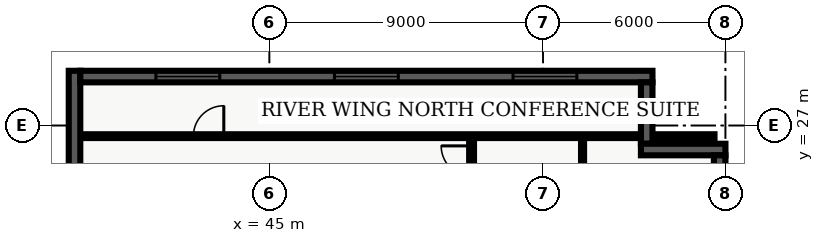
"""IFC4 building model, lengths in metres.
Left out: names, types, materials, properties, quantities, classifications, styles, units other than length and angle.
Written with IfcOpenShell. Run it as: python <this file> out.ifc"""

import sys

from ifc_helpers import new_model, entity, si_unit, converted_unit, direction, frame, origin_with_axes, origin_2d_with_axis, place, context, subcontext, project, spatial, polyline, rectangle, outline, extrude, element, fill, save


model = new_model("IFC4")
c1 = context("Model", 3, precision=1e-05, world=origin_with_axes(), true_north=direction((0.0, 1.0)))
c2 = subcontext(c1, "Body", "Model", "MODEL_VIEW")
j1 = project(units=[si_unit("LENGTHUNIT", "METRE"), converted_unit("PLANEANGLEUNIT", "DEGREE", entity("IfcPlaneAngleMeasure", 0.017), si_unit("PLANEANGLEUNIT", "RADIAN"), dimensions=[0, 0, 0, 0, 0, 0, 0])], contexts=[c1])
p1 = place(None, origin_with_axes())
s1 = spatial("IfcSite", under=j1, at=p1, CompositionType="ELEMENT")
p2 = place(p1, origin_with_axes())
s2 = spatial("IfcBuilding", under=s1, at=p2, CompositionType="ELEMENT")
p3 = place(p2, frame((0.0, 0.0, 40.5), z_axis=(0.0, 0.0, 1.0), x_axis=(1.0, 0.0, 0.0)))
s3 = spatial("IfcBuildingStorey", under=s2, at=p3, CompositionType="ELEMENT", Elevation=40.5)
p4 = place(p3, frame((51.65, 7.85, 0.0), z_axis=(0.0, 0.0, 1.0), x_axis=(0.0, 1.0, 0.0)))
e1 = element("IfcWall", 1, at=p4, inside=s3, PredefinedType="PARTITIONING", context=c2, shape_type="SweptSolid", body=[
    extrude(outline(polyline([(0.0, -0.08), (18.8, -0.08), (18.8, 0.08), (0.0, 0.08), (0.0, -0.08)])), origin_with_axes(), (0.0, 0.0, 1.0), 2.7),
])
p5 = place(p4, frame((4.453, 0.0, 0.0), z_axis=(0.0, 0.0, 1.0), x_axis=(1.0, 0.0, 0.0)))
e2 = element("IfcOpeningElement", 2, at=p5, cuts=e1, PredefinedType="OPENING", context=c2, shape_type="SweptSolid", body=[
    extrude(rectangle(XDim=1.0, YDim=0.18, at=origin_2d_with_axis()), origin_with_axes(), (0.0, 0.0, 1.0), 2.15),
])
p6 = place(p4, frame((7.831, 0.0, 0.0), z_axis=(0.0, 0.0, 1.0), x_axis=(1.0, 0.0, 0.0)))
e3 = element("IfcOpeningElement", 3, at=p6, cuts=e1, PredefinedType="OPENING", context=c2, shape_type="SweptSolid", body=[
    extrude(rectangle(XDim=1.0, YDim=0.18, at=origin_2d_with_axis()), origin_with_axes(), (0.0, 0.0, 1.0), 2.15),
])
p7 = place(p4, frame((11.898, 0.0, 0.0), z_axis=(0.0, 0.0, 1.0), x_axis=(1.0, 0.0, 0.0)))
e4 = element("IfcOpeningElement", 4, at=p7, cuts=e1, PredefinedType="OPENING", context=c2, shape_type="SweptSolid", body=[
    extrude(rectangle(XDim=1.0, YDim=0.18, at=origin_2d_with_axis()), origin_with_axes(), (0.0, 0.0, 1.0), 2.15),
])
p8 = place(p4, frame((17.98, 0.0, 0.0), z_axis=(0.0, 0.0, 1.0), x_axis=(1.0, 0.0, 0.0)))
e5 = element("IfcOpeningElement", 5, at=p8, cuts=e1, PredefinedType="OPENING", context=c2, shape_type="SweptSolid", body=[
    extrude(rectangle(XDim=1.0, YDim=0.18, at=origin_2d_with_axis()), origin_with_axes(), (0.0, 0.0, 1.0), 2.15),
])
p9 = place(p3, frame((38.76, 26.65, 0.0), z_axis=(0.0, 0.0, 1.0), x_axis=(1.0, 0.0, 0.0)))
e6 = element("IfcWall", 6, at=p9, inside=s3, PredefinedType="PARTITIONING", context=c2, shape_type="SweptSolid", body=[
    extrude(outline(polyline([(0.0, -0.062), (20.88, -0.062), (20.88, 0.062), (0.0, 0.062), (0.0, -0.062)])), origin_with_axes(), (0.0, 0.0, 1.0), 2.7),
])
p10 = place(p9, frame((4.24, 0.0, 0.0), z_axis=(0.0, 0.0, 1.0), x_axis=(1.0, 0.0, 0.0)))
e7 = element("IfcOpeningElement", 7, at=p10, cuts=e6, PredefinedType="OPENING", context=c2, shape_type="SweptSolid", body=[
    extrude(rectangle(XDim=1.0, YDim=0.145, at=origin_2d_with_axis()), origin_with_axes(), (0.0, 0.0, 1.0), 2.15),
])
p11 = place(p3, frame((55.3, 7.98, 0.0), z_axis=(0.0, 0.0, 1.0), x_axis=(0.0, 1.0, 0.0)))
e8 = element("IfcWall", 8, at=p11, inside=s3, PredefinedType="PARTITIONING", context=c2, shape_type="SweptSolid", body=[
    extrude(outline(polyline([(0.0, -0.05), (18.54, -0.05), (18.54, 0.05), (0.0, 0.05), (0.0, -0.05)])), origin_with_axes(), (0.0, 0.0, 1.0), 2.7),
])
p12 = place(p11, frame((3.073, 0.0, 0.0), z_axis=(0.0, 0.0, 1.0), x_axis=(1.0, 0.0, 0.0)))
e9 = element("IfcOpeningElement", 9, at=p12, cuts=e8, PredefinedType="OPENING", context=c2, shape_type="SweptSolid", body=[
    extrude(rectangle(XDim=0.95, YDim=0.12, at=origin_2d_with_axis()), origin_with_axes(), (0.0, 0.0, 1.0), 2.15),
])
p13 = place(p11, frame((7.981, 0.0, 0.0), z_axis=(0.0, 0.0, 1.0), x_axis=(1.0, 0.0, 0.0)))
e10 = element("IfcOpeningElement", 10, at=p13, cuts=e8, PredefinedType="OPENING", context=c2, shape_type="SweptSolid", body=[
    extrude(rectangle(XDim=0.95, YDim=0.12, at=origin_2d_with_axis()), origin_with_axes(), (0.0, 0.0, 1.0), 2.15),
])
p14 = place(p11, frame((11.768, 0.0, 0.0), z_axis=(0.0, 0.0, 1.0), x_axis=(1.0, 0.0, 0.0)))
e11 = element("IfcOpeningElement", 11, at=p14, cuts=e8, PredefinedType="OPENING", context=c2, shape_type="SweptSolid", body=[
    extrude(rectangle(XDim=0.95, YDim=0.12, at=origin_2d_with_axis()), origin_with_axes(), (0.0, 0.0, 1.0), 2.15),
])
p15 = place(p11, frame((16.201, 0.0, 0.0), z_axis=(0.0, 0.0, 1.0), x_axis=(1.0, 0.0, 0.0)))
e12 = element("IfcOpeningElement", 12, at=p15, cuts=e8, PredefinedType="OPENING", context=c2, shape_type="SweptSolid", body=[
    extrude(rectangle(XDim=0.95, YDim=0.12, at=origin_2d_with_axis()), origin_with_axes(), (0.0, 0.0, 1.0), 2.15),
])
p16 = place(p3, frame((38.59, 21.22, 0.0), z_axis=(0.0, 0.0, 1.0), x_axis=(0.0, 1.0, 0.0)))
e13 = element("IfcWall", 13, at=p16, inside=s3, PredefinedType="SOLIDWALL", context=c2, shape_type="SweptSolid", body=[
    extrude(outline(polyline([(0.0, -0.19), (7.58, -0.19), (7.58, 0.19), (0.0, 0.19), (0.0, -0.19)])), origin_with_axes(), (0.0, 0.0, 1.0), 3.66),
])
p17 = place(p3, frame((38.78, 28.61, 0.0), z_axis=(0.0, 0.0, 1.0), x_axis=(1.0, 0.0, 0.0)))
e14 = element("IfcWall", 14, at=p17, inside=s3, PredefinedType="SOLIDWALL", context=c2, shape_type="SweptSolid", body=[
    extrude(outline(polyline([(0.0, -0.19), (18.82, -0.19), (18.82, 0.19), (0.0, 0.19), (0.0, -0.19)])), origin_with_axes(), (0.0, 0.0, 1.0), 3.66),
])
p18 = place(p17, frame((3.537, 0.0, 0.45), z_axis=(0.0, 0.0, 1.0), x_axis=(1.0, 0.0, 0.0)))
e15 = element("IfcOpeningElement", 15, at=p18, cuts=e14, PredefinedType="OPENING", context=c2, shape_type="SweptSolid", body=[
    extrude(rectangle(XDim=2.1, YDim=0.4, at=origin_2d_with_axis()), origin_with_axes(), (0.0, 0.0, 1.0), 2.2),
])
p19 = place(p17, frame((9.41, 0.0, 0.45), z_axis=(0.0, 0.0, 1.0), x_axis=(1.0, 0.0, 0.0)))
e16 = element("IfcOpeningElement", 16, at=p19, cuts=e14, PredefinedType="OPENING", context=c2, shape_type="SweptSolid", body=[
    extrude(rectangle(XDim=2.1, YDim=0.4, at=origin_2d_with_axis()), origin_with_axes(), (0.0, 0.0, 1.0), 2.2),
])
p20 = place(p17, frame((15.283, 0.0, 0.45), z_axis=(0.0, 0.0, 1.0), x_axis=(1.0, 0.0, 0.0)))
e17 = element("IfcOpeningElement", 17, at=p20, cuts=e14, PredefinedType="OPENING", context=c2, shape_type="SweptSolid", body=[
    extrude(rectangle(XDim=2.1, YDim=0.4, at=origin_2d_with_axis()), origin_with_axes(), (0.0, 0.0, 1.0), 2.2),
])
p21 = place(p3, frame((57.41, 28.42, 0.0), z_axis=(0.0, 0.0, 1.0), x_axis=(0.0, -1.0, 0.0)))
e18 = element("IfcWall", 18, at=p21, inside=s3, PredefinedType="SOLIDWALL", context=c2, shape_type="SweptSolid", body=[
    extrude(outline(polyline([(0.0, -0.19), (2.02, -0.19), (2.02, 0.19), (0.0, 0.19), (0.0, -0.19)])), origin_with_axes(), (0.0, 0.0, 1.0), 3.66),
])
p22 = place(p3, frame((57.22, 26.21, 0.0), z_axis=(0.0, 0.0, 1.0), x_axis=(1.0, 0.0, 0.0)))
e19 = element("IfcWall", 19, at=p22, inside=s3, PredefinedType="SOLIDWALL", context=c2, shape_type="SweptSolid", body=[
    extrude(outline(polyline([(0.0, -0.19), (2.78, -0.19), (2.78, 0.19), (0.0, 0.19), (0.0, -0.19)])), origin_with_axes(), (0.0, 0.0, 1.0), 3.66),
])
p23 = place(p3, frame((59.81, 26.02, 0.0), z_axis=(0.0, 0.0, 1.0), x_axis=(0.0, -1.0, 0.0)))
e20 = element("IfcWall", 20, at=p23, inside=s3, PredefinedType="SOLIDWALL", context=c2, shape_type="SweptSolid", body=[
    extrude(outline(polyline([(0.0, -0.19), (23.62, -0.19), (23.62, 0.19), (0.0, 0.19), (0.0, -0.19)])), origin_with_axes(), (0.0, 0.0, 1.0), 3.66),
])
p24 = place(p23, frame((20.218, 0.0, 0.45), z_axis=(0.0, 0.0, 1.0), x_axis=(1.0, 0.0, 0.0)))
e21 = element("IfcOpeningElement", 21, at=p24, cuts=e20, PredefinedType="OPENING", context=c2, shape_type="SweptSolid", body=[
    extrude(rectangle(XDim=2.1, YDim=0.4, at=origin_2d_with_axis()), origin_with_axes(), (0.0, 0.0, 1.0), 2.2),
])
p25 = place(p9, frame((4.24, 0.0, 0.0), z_axis=(0.0, 0.0, 1.0), x_axis=(1.0, 0.0, 0.0)))
e22 = element("IfcDoor", 22, at=p25, inside=s3, OperationType="SINGLE_SWING_RIGHT", PredefinedType="DOOR", context=c2, shape_type="SweptSolid", body=[
    extrude(rectangle(XDim=1.0, YDim=0.075, at=origin_2d_with_axis()), origin_with_axes(), (0.0, 0.0, 1.0), 2.15),
])
fill(e7, e22)
p26 = place(p4, frame((17.98, 0.0, 0.0), z_axis=(0.0, 0.0, 1.0), x_axis=(1.0, 0.0, 0.0)))
e23 = element("IfcDoor", 23, at=p26, inside=s3, OperationType="SINGLE_SWING_RIGHT", PredefinedType="DOOR", context=c2, shape_type="SweptSolid", body=[
    extrude(rectangle(XDim=1.0, YDim=0.09, at=origin_2d_with_axis()), origin_with_axes(), (0.0, 0.0, 1.0), 2.15),
])
fill(e5, e23)
p27 = place(p17, frame((3.537, 0.0, 0.45), z_axis=(0.0, 0.0, 1.0), x_axis=(1.0, 0.0, 0.0)))
e24 = element("IfcWindow", 24, at=p27, inside=s3, PredefinedType="WINDOW", context=c2, shape_type="SweptSolid", body=[
    extrude(rectangle(XDim=2.1, YDim=0.09, at=origin_2d_with_axis()), origin_with_axes(), (0.0, 0.0, 1.0), 2.2),
])
fill(e15, e24)
p28 = place(p17, frame((9.41, 0.0, 0.45), z_axis=(0.0, 0.0, 1.0), x_axis=(1.0, 0.0, 0.0)))
e25 = element("IfcWindow", 25, at=p28, inside=s3, PredefinedType="WINDOW", context=c2, shape_type="SweptSolid", body=[
    extrude(rectangle(XDim=2.1, YDim=0.09, at=origin_2d_with_axis()), origin_with_axes(), (0.0, 0.0, 1.0), 2.2),
])
fill(e16, e25)
p29 = place(p17, frame((15.283, 0.0, 0.45), z_axis=(0.0, 0.0, 1.0), x_axis=(1.0, 0.0, 0.0)))
e26 = element("IfcWindow", 26, at=p29, inside=s3, PredefinedType="WINDOW", context=c2, shape_type="SweptSolid", body=[
    extrude(rectangle(XDim=2.1, YDim=0.09, at=origin_2d_with_axis()), origin_with_axes(), (0.0, 0.0, 1.0), 2.2),
])
fill(e17, e26)
save(model, sys.argv[1])
